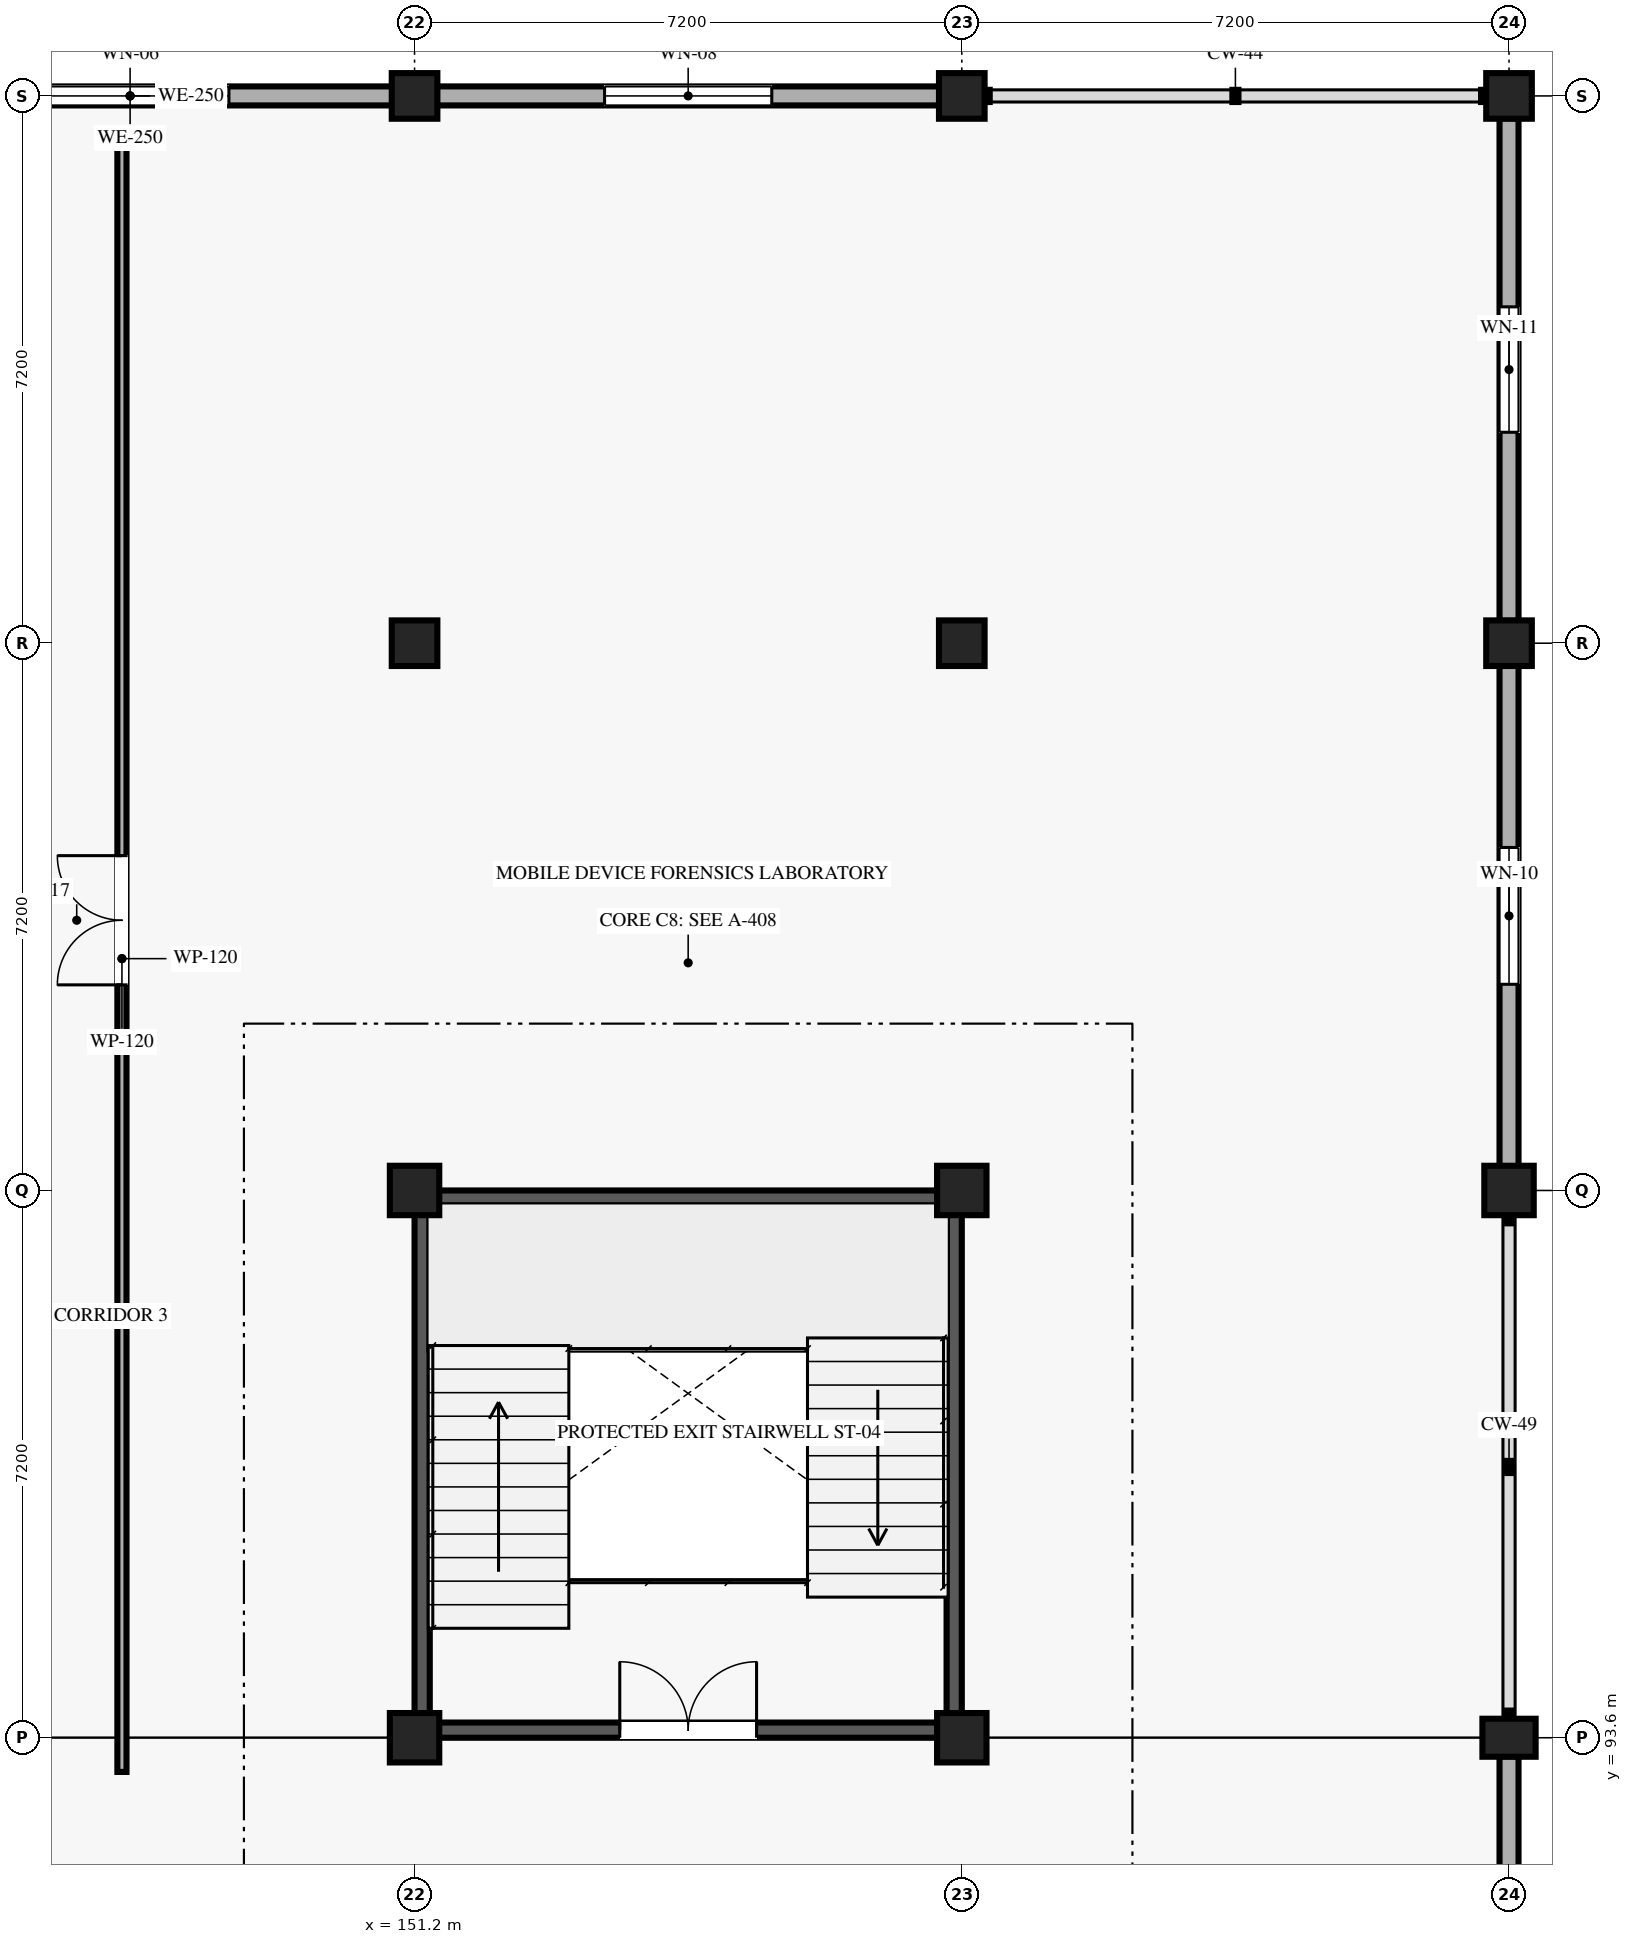
"""IFC4 building model, lengths in metres.
Left out: names, types, materials, properties, quantities, classifications, styles, units other than length and angle.
Written with IfcOpenShell. Run it as: python <this file> out.ifc"""

import sys

from ifc_helpers import new_model, si_unit, direction, frame, frame_2d, origin, origin_2d, place, context, subcontext, project, spatial, rectangle, extrude, element, fill, save


model = new_model("IFC4")
c1 = context("Model", 3, precision=1e-05, world=origin(), true_north=direction((0.0, 1.0)))
c2 = subcontext(c1, "Body", "Model", "MODEL_VIEW")
j1 = project(units=[si_unit("LENGTHUNIT", "METRE"), si_unit("PLANEANGLEUNIT", "RADIAN")], contexts=[c1])
p1 = place(None, origin())
s1 = spatial("IfcSite", under=j1, at=p1, CompositionType="ELEMENT")
p2 = place(p1, origin())
s2 = spatial("IfcBuilding", under=s1, at=p2, CompositionType="ELEMENT")
p3 = place(p2, frame((0.0, 0.0, 17.55)))
s3 = spatial("IfcBuildingStorey", under=s2, at=p3, CompositionType="ELEMENT", Elevation=17.55)
for number, where, z_axis, x_axis in (
    (1, (151.2, 93.6, 0.0), (0.0, 0.0, 1.0), (1.0, 0.0, 0.0)),
    (2, (151.2, 100.8, 0.0), (0.0, 0.0, 1.0), (1.0, 0.0, 0.0)),
):
    element("IfcColumn", number, at=place(p3, frame(where, z_axis=z_axis, x_axis=x_axis)), inside=s3, PredefinedType="COLUMN", context=c2, shape_type="SweptSolid", body=[
        extrude(rectangle(XDim=0.65, YDim=0.65, at=origin_2d()), origin(), (0.0, 0.0, 1.0), 4.05),
    ])
for number, where, z_axis, x_axis in (
    (3, (151.2, 108.0, 0.0), (0.0, 0.0, 1.0), (1.0, 0.0, 0.0)),
    (4, (151.2, 115.2, 0.0), (0.0, 0.0, 1.0), (1.0, 0.0, 0.0)),
):
    element("IfcColumn", number, at=place(p3, frame(where, z_axis=z_axis, x_axis=x_axis)), inside=s3, PredefinedType="COLUMN", context=c2, shape_type="SweptSolid", body=[
        extrude(rectangle(XDim=0.6, YDim=0.6, at=origin_2d()), origin(), (0.0, 0.0, 1.0), 4.05),
    ])
for number, where, z_axis, x_axis in (
    (5, (158.4, 93.6, 0.0), (0.0, 0.0, 1.0), (1.0, 0.0, 0.0)),
    (6, (158.4, 100.8, 0.0), (0.0, 0.0, 1.0), (1.0, 0.0, 0.0)),
):
    element("IfcColumn", number, at=place(p3, frame(where, z_axis=z_axis, x_axis=x_axis)), inside=s3, PredefinedType="COLUMN", context=c2, shape_type="SweptSolid", body=[
        extrude(rectangle(XDim=0.65, YDim=0.65, at=origin_2d()), origin(), (0.0, 0.0, 1.0), 4.05),
    ])
for number, where, z_axis, x_axis in (
    (7, (158.4, 108.0, 0.0), (0.0, 0.0, 1.0), (1.0, 0.0, 0.0)),
    (8, (158.4, 115.2, 0.0), (0.0, 0.0, 1.0), (1.0, 0.0, 0.0)),
):
    element("IfcColumn", number, at=place(p3, frame(where, z_axis=z_axis, x_axis=x_axis)), inside=s3, PredefinedType="COLUMN", context=c2, shape_type="SweptSolid", body=[
        extrude(rectangle(XDim=0.6, YDim=0.6, at=origin_2d()), origin(), (0.0, 0.0, 1.0), 4.05),
    ])
p4 = place(p3, frame((165.6, 93.6, 0.0), z_axis=(0.0, 0.0, 1.0), x_axis=(0.0, 1.0, 0.0)))
e9 = element("IfcColumn", 9, at=p4, inside=s3, PredefinedType="COLUMN", context=c2, shape_type="SweptSolid", body=[
    extrude(rectangle(XDim=0.5, YDim=0.7, at=origin_2d()), origin(), (0.0, 0.0, 1.0), 4.05),
])
p5 = place(p3, frame((165.6, 100.8, 0.0), z_axis=(0.0, 0.0, 1.0), x_axis=(1.0, 0.0, 0.0)))
e10 = element("IfcColumn", 10, at=p5, inside=s3, PredefinedType="COLUMN", context=c2, shape_type="SweptSolid", body=[
    extrude(rectangle(XDim=0.65, YDim=0.65, at=origin_2d()), origin(), (0.0, 0.0, 1.0), 4.05),
])
for number, where, z_axis, x_axis in (
    (11, (165.6, 108.0, 0.0), (0.0, 0.0, 1.0), (1.0, 0.0, 0.0)),
    (12, (165.6, 115.2, 0.0), (0.0, 0.0, 1.0), (1.0, 0.0, 0.0)),
):
    element("IfcColumn", number, at=place(p3, frame(where, z_axis=z_axis, x_axis=x_axis)), inside=s3, PredefinedType="COLUMN", context=c2, shape_type="SweptSolid", body=[
        extrude(rectangle(XDim=0.6, YDim=0.6, at=origin_2d()), origin(), (0.0, 0.0, 1.0), 4.05),
    ])
p6 = place(p3, frame((144.01, 115.2, 0.0), z_axis=(0.0, 0.0, 1.0), x_axis=(1.0, 0.0, 0.0)))
e13 = element("IfcWall", 13, at=p6, inside=s3, PredefinedType="SOLIDWALL", context=c2, shape_type="SweptSolid", body=[
    extrude(rectangle(XDim=6.895, YDim=0.25, at=frame_2d((3.448, 0.0))), origin(), (0.0, 0.0, 1.0), 3.295),
])
p7 = place(p6, frame((2.147, 0.0, 0.85)))
e14 = element("IfcOpeningElement", 14, at=p7, cuts=e13, PredefinedType="OPENING", context=c2, shape_type="SweptSolid", body=[
    extrude(rectangle(XDim=2.6, YDim=1.8, at=frame_2d((1.3, 0.9))), frame((0.0, 0.135, 0.0), z_axis=(0.0, -1.0, 0.0), x_axis=(1.0, 0.0, 0.0)), (0.0, 0.0, 1.0), 0.27),
])
p8 = place(p3, frame((151.495, 115.2, 0.0), z_axis=(0.0, 0.0, 1.0), x_axis=(1.0, 0.0, 0.0)))
e15 = element("IfcWall", 15, at=p8, inside=s3, PredefinedType="SOLIDWALL", context=c2, shape_type="SweptSolid", body=[
    extrude(rectangle(XDim=6.61, YDim=0.25, at=frame_2d((3.305, 0.0))), origin(), (0.0, 0.0, 1.0), 3.295),
])
p9 = place(p8, frame((2.205, 0.0, 0.85)))
e16 = element("IfcOpeningElement", 16, at=p9, cuts=e15, PredefinedType="OPENING", context=c2, shape_type="SweptSolid", body=[
    extrude(rectangle(XDim=2.2, YDim=1.7, at=frame_2d((1.1, 0.85))), frame((0.0, 0.135, 0.0), z_axis=(0.0, -1.0, 0.0), x_axis=(1.0, 0.0, 0.0)), (0.0, 0.0, 1.0), 0.27),
])
p10 = place(p3, frame((165.6, 86.645, 0.0), z_axis=(0.0, 0.0, 1.0), x_axis=(0.0, 1.0, 0.0)))
e17 = element("IfcWall", 17, at=p10, inside=s3, PredefinedType="SOLIDWALL", context=c2, shape_type="SweptSolid", body=[
    extrude(rectangle(XDim=6.71, YDim=0.25, at=frame_2d((3.355, 0.0))), origin(), (0.0, 0.0, 1.0), 3.295),
])
p11 = place(p10, frame((2.255, 0.0, 0.85)))
e18 = element("IfcOpeningElement", 18, at=p11, cuts=e17, PredefinedType="OPENING", context=c2, shape_type="SweptSolid", body=[
    extrude(rectangle(XDim=2.2, YDim=1.7, at=frame_2d((1.1, 0.85))), frame((0.0, 0.135, 0.0), z_axis=(0.0, -1.0, 0.0), x_axis=(1.0, 0.0, 0.0)), (0.0, 0.0, 1.0), 0.27),
])
p12 = place(p3, frame((165.6, 101.12, 0.0), z_axis=(0.0, 0.0, 1.0), x_axis=(0.0, 1.0, 0.0)))
e19 = element("IfcWall", 19, at=p12, inside=s3, PredefinedType="SOLIDWALL", context=c2, shape_type="SweptSolid", body=[
    extrude(rectangle(XDim=6.585, YDim=0.25, at=frame_2d((3.292, 0.0))), origin(), (0.0, 0.0, 1.0), 3.295),
])
p13 = place(p12, frame((2.393, 0.0, 0.85)))
e20 = element("IfcOpeningElement", 20, at=p13, cuts=e19, PredefinedType="OPENING", context=c2, shape_type="SweptSolid", body=[
    extrude(rectangle(XDim=1.8, YDim=1.6, at=frame_2d((0.9, 0.8))), frame((0.0, 0.135, 0.0), z_axis=(0.0, -1.0, 0.0), x_axis=(1.0, 0.0, 0.0)), (0.0, 0.0, 1.0), 0.27),
])
p14 = place(p3, frame((165.6, 108.295, 0.0), z_axis=(0.0, 0.0, 1.0), x_axis=(0.0, 1.0, 0.0)))
e21 = element("IfcWall", 21, at=p14, inside=s3, PredefinedType="SOLIDWALL", context=c2, shape_type="SweptSolid", body=[
    extrude(rectangle(XDim=6.61, YDim=0.25, at=frame_2d((3.305, 0.0))), origin(), (0.0, 0.0, 1.0), 3.295),
])
p15 = place(p14, frame((2.48, 0.0, 0.85)))
e22 = element("IfcOpeningElement", 22, at=p15, cuts=e21, PredefinedType="OPENING", context=c2, shape_type="SweptSolid", body=[
    extrude(rectangle(XDim=1.65, YDim=1.55, at=frame_2d((0.825, 0.775))), frame((0.0, 0.135, 0.0), z_axis=(0.0, -1.0, 0.0), x_axis=(1.0, 0.0, 0.0)), (0.0, 0.0, 1.0), 0.27),
])
p16 = place(p3, frame((151.4, 93.7, 0.0), z_axis=(0.0, 0.0, 1.0), x_axis=(1.0, 0.0, 0.0)))
e23 = element("IfcWall", 23, at=p16, inside=s3, PredefinedType="SHEAR", context=c2, shape_type="SweptSolid", body=[
    extrude(rectangle(XDim=6.8, YDim=0.2, at=frame_2d((3.4, 0.0))), origin(), (0.0, 0.0, 1.0), 3.83),
])
p17 = place(p16, frame((2.5, 0.0, 0.0)))
e24 = element("IfcOpeningElement", 24, at=p17, cuts=e23, PredefinedType="OPENING", context=c2, shape_type="SweptSolid", body=[
    extrude(rectangle(XDim=1.8, YDim=2.2, at=frame_2d((0.9, 1.1))), frame((0.0, 0.11, 0.0), z_axis=(0.0, -1.0, 0.0), x_axis=(1.0, 0.0, 0.0)), (0.0, 0.0, 1.0), 0.22),
])
for number, where, z_axis, x_axis in (
    (25, (151.4, 100.7, 0.0), (0.0, 0.0, 1.0), (1.0, 0.0, 0.0)),
    (26, (151.3, 93.8, 0.0), (0.0, 0.0, 1.0), (0.0, 1.0, 0.0)),
    (27, (158.3, 93.8, 0.0), (0.0, 0.0, 1.0), (0.0, 1.0, 0.0)),
):
    element("IfcWall", number, at=place(p3, frame(where, z_axis=z_axis, x_axis=x_axis)), inside=s3, PredefinedType="SHEAR", context=c2, shape_type="SweptSolid", body=[
        extrude(rectangle(XDim=6.8, YDim=0.2, at=frame_2d((3.4, 0.0))), origin(), (0.0, 0.0, 1.0), 3.83),
    ])
p18 = place(p3, frame((147.35, 93.15, 0.0), z_axis=(0.0, 0.0, 1.0), x_axis=(0.0, 1.0, 0.0)))
e28 = element("IfcWall", 28, at=p18, inside=s3, PredefinedType="PARTITIONING", context=c2, shape_type="SweptSolid", body=[
    extrude(rectangle(XDim=21.4, YDim=0.12, at=frame_2d((10.7, 0.0))), origin(), (0.0, 0.0, 1.0), 3.83),
])
p19 = place(p18, frame((10.355, 0.0, 0.0)))
e29 = element("IfcOpeningElement", 29, at=p19, cuts=e28, PredefinedType="OPENING", context=c2, shape_type="SweptSolid", body=[
    extrude(rectangle(XDim=1.7, YDim=2.2, at=frame_2d((0.85, 1.1))), frame((0.0, 0.07, 0.0), z_axis=(0.0, -1.0, 0.0), x_axis=(1.0, 0.0, 0.0)), (0.0, 0.0, 1.0), 0.14),
])
p20 = place(p7, origin())
e30 = element("IfcWindow", 30, at=p20, inside=s3, PartitioningType="SINGLE_PANEL", PredefinedType="WINDOW", context=c2, shape_type="SweptSolid", body=[
    extrude(rectangle(XDim=2.6, YDim=1.8, at=frame_2d((1.3, 0.9))), frame((0.0, 0.03, 0.0), z_axis=(0.0, -1.0, 0.0), x_axis=(1.0, 0.0, 0.0)), (0.0, 0.0, 1.0), 0.06),
])
fill(e14, e30)
p21 = place(p9, origin())
e31 = element("IfcWindow", 31, at=p21, inside=s3, PartitioningType="SINGLE_PANEL", PredefinedType="WINDOW", context=c2, shape_type="SweptSolid", body=[
    extrude(rectangle(XDim=2.2, YDim=1.7, at=frame_2d((1.1, 0.85))), frame((0.0, 0.03, 0.0), z_axis=(0.0, -1.0, 0.0), x_axis=(1.0, 0.0, 0.0)), (0.0, 0.0, 1.0), 0.06),
])
fill(e16, e31)
p22 = place(p13, origin())
e32 = element("IfcWindow", 32, at=p22, inside=s3, PartitioningType="SINGLE_PANEL", PredefinedType="WINDOW", context=c2, shape_type="SweptSolid", body=[
    extrude(rectangle(XDim=1.8, YDim=1.6, at=frame_2d((0.9, 0.8))), frame((0.0, 0.03, 0.0), z_axis=(0.0, -1.0, 0.0), x_axis=(1.0, 0.0, 0.0)), (0.0, 0.0, 1.0), 0.06),
])
fill(e20, e32)
p23 = place(p15, origin())
e33 = element("IfcWindow", 33, at=p23, inside=s3, PartitioningType="SINGLE_PANEL", PredefinedType="WINDOW", context=c2, shape_type="SweptSolid", body=[
    extrude(rectangle(XDim=1.65, YDim=1.55, at=frame_2d((0.825, 0.775))), frame((0.0, 0.03, 0.0), z_axis=(0.0, -1.0, 0.0), x_axis=(1.0, 0.0, 0.0)), (0.0, 0.0, 1.0), 0.06),
])
fill(e22, e33)
p24 = place(p17, origin())
e34 = element("IfcDoor", 34, at=p24, inside=s3, OperationType="DOUBLE_DOOR_SINGLE_SWING", PredefinedType="DOOR", context=c2, shape_type="SweptSolid", body=[
    extrude(rectangle(XDim=1.8, YDim=2.2, at=frame_2d((0.9, 1.1))), frame((0.0, 0.025, 0.0), z_axis=(0.0, -1.0, 0.0), x_axis=(1.0, 0.0, 0.0)), (0.0, 0.0, 1.0), 0.05),
])
fill(e24, e34)
p25 = place(p19, origin())
e35 = element("IfcDoor", 35, at=p25, inside=s3, OperationType="DOUBLE_DOOR_SINGLE_SWING", PredefinedType="DOOR", context=c2, shape_type="SweptSolid", body=[
    extrude(rectangle(XDim=1.7, YDim=2.2, at=frame_2d((0.85, 1.1))), frame((0.0, 0.025, 0.0), z_axis=(0.0, -1.0, 0.0), x_axis=(1.0, 0.0, 0.0)), (0.0, 0.0, 1.0), 0.05),
])
fill(e29, e35)
save(model, sys.argv[1])
